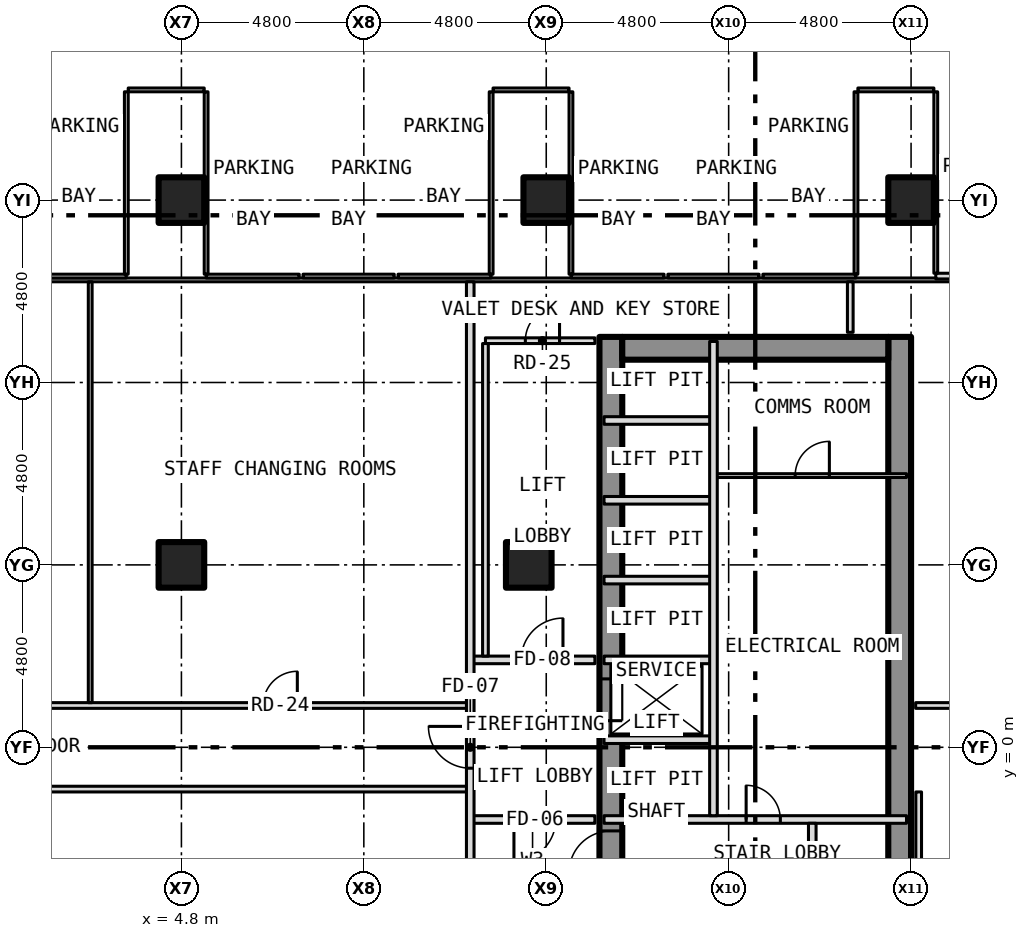
"""IFC4 building model, lengths in metres.
Left out: names, types, materials, properties, quantities, classifications, styles, units other than length and angle.
Written with IfcOpenShell. Run it as: python <this file> out.ifc"""

import sys

from ifc_helpers import new_model, si_unit, direction, frame, frame_2d, origin, origin_2d, place, context, subcontext, project, spatial, rectangle, hollow_rectangle, extrude, element, fill, save


model = new_model("IFC4")
c1 = context("Model", 3, precision=1e-05, world=origin(), true_north=direction((0.0, 1.0)))
c2 = subcontext(c1, "Body", "Model", "MODEL_VIEW")
j1 = project(units=[si_unit("LENGTHUNIT", "METRE"), si_unit("PLANEANGLEUNIT", "RADIAN")], contexts=[c1])
p1 = place(None, origin())
s1 = spatial("IfcSite", under=j1, at=p1, CompositionType="ELEMENT")
p2 = place(p1, origin())
s2 = spatial("IfcBuilding", under=s1, at=p2, CompositionType="ELEMENT")
p3 = place(p2, frame((0.0, 0.0, -5.0)))
s3 = spatial("IfcBuildingStorey", under=s2, at=p3, CompositionType="ELEMENT", Elevation=-5.0)
for number, where, z_axis, x_axis in (
    (1, (4.8, 4.8, -0.3), (0.0, 0.0, 1.0), (1.0, 0.0, 0.0)),
    (2, (4.8, 14.4, -0.3), (0.0, 0.0, 1.0), (1.0, 0.0, 0.0)),
    (3, (13.94, 4.8, -0.3), (0.0, 0.0, 1.0), (1.0, 0.0, 0.0)),
    (4, (14.4, 14.4, -0.3), (0.0, 0.0, 1.0), (1.0, 0.0, 0.0)),
    (5, (24.0, 14.4, -0.3), (0.0, 0.0, 1.0), (1.0, 0.0, 0.0)),
):
    element("IfcColumn", number, at=place(p3, frame(where, z_axis=z_axis, x_axis=x_axis)), inside=s3, PredefinedType="COLUMN", context=c2, shape_type="SweptSolid", body=[
        extrude(hollow_rectangle(XDim=1.2, YDim=1.2, WallThickness=0.07, at=origin_2d()), origin(), (0.0, 0.0, 1.0), 5.0),
    ])
p4 = place(p3, frame((16.1, -10.8, 0.0), z_axis=(0.0, 0.0, 1.0), x_axis=(0.0, 1.0, 0.0)))
e6 = element("IfcWall", 6, at=p4, inside=s3, PredefinedType="SHEAR", context=c2, shape_type="SweptSolid", body=[
    extrude(rectangle(XDim=21.6, YDim=0.6, at=frame_2d((10.8, 0.0))), origin(), (0.0, 0.0, 1.0), 4.7),
])
p5 = place(p4, frame((11.5, 0.0, 0.0)))
e7 = element("IfcOpeningElement", 7, at=p5, cuts=e6, PredefinedType="OPENING", context=c2, shape_type="SweptSolid", body=[
    extrude(rectangle(XDim=1.1, YDim=2.1, at=frame_2d((0.55, 1.05))), frame((0.0, 0.312, 0.0), z_axis=(0.0, -1.0, 0.0), x_axis=(1.0, 0.0, 0.0)), (0.0, 0.0, 1.0), 0.624),
])
p6 = place(p4, frame((5.642, 0.0, 0.0)))
e8 = element("IfcOpeningElement", 8, at=p6, cuts=e6, PredefinedType="OPENING", context=c2, shape_type="SweptSolid", body=[
    extrude(rectangle(XDim=1.1, YDim=2.1, at=frame_2d((0.55, 1.05))), frame((0.0, 0.312, 0.0), z_axis=(0.0, -1.0, 0.0), x_axis=(1.0, 0.0, 0.0)), (0.0, 0.0, 1.0), 0.624),
])
p7 = place(p4, frame((7.5, 0.0, 0.0)))
e9 = element("IfcOpeningElement", 9, at=p7, cuts=e6, PredefinedType="OPENING", context=c2, shape_type="SweptSolid", body=[
    extrude(rectangle(XDim=1.1, YDim=2.1, at=frame_2d((0.55, 1.05))), frame((0.0, 0.312, 0.0), z_axis=(0.0, -1.0, 0.0), x_axis=(1.0, 0.0, 0.0)), (0.0, 0.0, 1.0), 0.624),
])
p8 = place(p3, frame((23.7, -10.8, 0.0), z_axis=(0.0, 0.0, 1.0), x_axis=(0.0, 1.0, 0.0)))
e10 = element("IfcWall", 10, at=p8, inside=s3, PredefinedType="SHEAR", context=c2, shape_type="SweptSolid", body=[
    extrude(rectangle(XDim=21.6, YDim=0.6, at=frame_2d((10.8, 0.0))), origin(), (0.0, 0.0, 1.0), 4.7),
])
p9 = place(p3, frame((16.4, 10.5, 0.0), z_axis=(0.0, 0.0, 1.0), x_axis=(1.0, 0.0, 0.0)))
e11 = element("IfcWall", 11, at=p9, inside=s3, PredefinedType="SHEAR", context=c2, shape_type="SweptSolid", body=[
    extrude(rectangle(XDim=7.0, YDim=0.6, at=frame_2d((3.5, 0.0))), origin(), (0.0, 0.0, 1.0), 4.7),
])
p10 = place(p3, frame((12.4, -1.9, 0.0), z_axis=(0.0, 0.0, 1.0), x_axis=(1.0, 0.0, 0.0)))
e12 = element("IfcWall", 12, at=p10, inside=s3, PredefinedType="PARTITIONING", context=c2, shape_type="SweptSolid", body=[
    extrude(rectangle(XDim=3.28, YDim=0.2, at=frame_2d((1.64, 0.0))), origin(), (0.0, 0.0, 1.0), 4.7),
])
p11 = place(p10, frame((1.15, 0.0, 0.0)))
e13 = element("IfcOpeningElement", 13, at=p11, cuts=e12, PredefinedType="OPENING", context=c2, shape_type="SweptSolid", body=[
    extrude(rectangle(XDim=1.1, YDim=2.1, at=frame_2d((0.55, 1.05))), frame((0.0, 0.112, 0.0), z_axis=(0.0, -1.0, 0.0), x_axis=(1.0, 0.0, 0.0)), (0.0, 0.0, 1.0), 0.224),
])
p12 = place(p3, frame((15.92, -1.9, 0.0), z_axis=(0.0, 0.0, 1.0), x_axis=(1.0, 0.0, 0.0)))
e14 = element("IfcWall", 14, at=p12, inside=s3, PredefinedType="PARTITIONING", context=c2, shape_type="SweptSolid", body=[
    extrude(rectangle(XDim=7.96, YDim=0.2, at=frame_2d((3.98, 0.0))), origin(), (0.0, 0.0, 1.0), 4.7),
])
p13 = place(p12, frame((3.74, 0.0, 0.0)))
e15 = element("IfcOpeningElement", 15, at=p13, cuts=e14, PredefinedType="OPENING", context=c2, shape_type="SweptSolid", body=[
    extrude(rectangle(XDim=0.9, YDim=2.1, at=frame_2d((0.45, 1.05))), frame((0.0, 0.112, 0.0), z_axis=(0.0, -1.0, 0.0), x_axis=(1.0, 0.0, 0.0)), (0.0, 0.0, 1.0), 0.224),
])
p14 = place(p3, frame((-12.4, -1.1, 0.0), z_axis=(0.0, 0.0, 1.0), x_axis=(1.0, 0.0, 0.0)))
e16 = element("IfcWall", 16, at=p14, inside=s3, PredefinedType="PARTITIONING", context=c2, shape_type="SweptSolid", body=[
    extrude(rectangle(XDim=24.8, YDim=0.15, at=frame_2d((12.4, 0.0))), origin(), (0.0, 0.0, 1.0), 4.7),
])
p15 = place(p3, frame((15.92, 0.2, 0.0), z_axis=(0.0, 0.0, 1.0), x_axis=(1.0, 0.0, 0.0)))
e17 = element("IfcWall", 17, at=p15, inside=s3, PredefinedType="PARTITIONING", context=c2, shape_type="SweptSolid", body=[
    extrude(rectangle(XDim=2.88, YDim=0.2, at=frame_2d((1.44, 0.0))), origin(), (0.0, 0.0, 1.0), 4.7),
])
p16 = place(p3, frame((-12.4, 1.1, 0.0), z_axis=(0.0, 0.0, 1.0), x_axis=(1.0, 0.0, 0.0)))
e18 = element("IfcWall", 18, at=p16, inside=s3, PredefinedType="PARTITIONING", context=c2, shape_type="SweptSolid", body=[
    extrude(rectangle(XDim=24.8, YDim=0.15, at=frame_2d((12.4, 0.0))), origin(), (0.0, 0.0, 1.0), 4.7),
])
p17 = place(p16, frame((9.35, 0.0, 0.0)))
e19 = element("IfcOpeningElement", 19, at=p17, cuts=e18, PredefinedType="OPENING", context=c2, shape_type="SweptSolid", body=[
    extrude(rectangle(XDim=0.9, YDim=2.1, at=frame_2d((0.45, 1.05))), frame((0.0, 0.087, 0.0), z_axis=(0.0, -1.0, 0.0), x_axis=(1.0, 0.0, 0.0)), (0.0, 0.0, 1.0), 0.174),
])
p18 = place(p16, frame((19.35, 0.0, 0.0)))
e20 = element("IfcOpeningElement", 20, at=p18, cuts=e18, PredefinedType="OPENING", context=c2, shape_type="SweptSolid", body=[
    extrude(rectangle(XDim=0.9, YDim=2.1, at=frame_2d((0.45, 1.05))), frame((0.0, 0.087, 0.0), z_axis=(0.0, -1.0, 0.0), x_axis=(1.0, 0.0, 0.0)), (0.0, 0.0, 1.0), 0.174),
])
p19 = place(p3, frame((24.12, 1.1, 0.0), z_axis=(0.0, 0.0, 1.0), x_axis=(1.0, 0.0, 0.0)))
e21 = element("IfcWall", 21, at=p19, inside=s3, PredefinedType="PARTITIONING", context=c2, shape_type="SweptSolid", body=[
    extrude(rectangle(XDim=8.23, YDim=0.15, at=frame_2d((4.115, 0.0))), origin(), (0.0, 0.0, 1.0), 4.7),
])
p20 = place(p19, frame((3.63, 0.0, 0.0)))
e22 = element("IfcOpeningElement", 22, at=p20, cuts=e21, PredefinedType="OPENING", context=c2, shape_type="SweptSolid", body=[
    extrude(rectangle(XDim=0.9, YDim=2.1, at=frame_2d((0.45, 1.05))), frame((0.0, 0.087, 0.0), z_axis=(0.0, -1.0, 0.0), x_axis=(1.0, 0.0, 0.0)), (0.0, 0.0, 1.0), 0.174),
])
p21 = place(p3, frame((12.4, 2.3, 0.0), z_axis=(0.0, 0.0, 1.0), x_axis=(1.0, 0.0, 0.0)))
e23 = element("IfcWall", 23, at=p21, inside=s3, PredefinedType="PARTITIONING", context=c2, shape_type="SweptSolid", body=[
    extrude(rectangle(XDim=3.28, YDim=0.2, at=frame_2d((1.64, 0.0))), origin(), (0.0, 0.0, 1.0), 4.7),
])
p22 = place(p21, frame((1.34, 0.0, 0.0)))
e24 = element("IfcOpeningElement", 24, at=p22, cuts=e23, PredefinedType="OPENING", context=c2, shape_type="SweptSolid", body=[
    extrude(rectangle(XDim=1.1, YDim=2.1, at=frame_2d((0.55, 1.05))), frame((0.0, 0.112, 0.0), z_axis=(0.0, -1.0, 0.0), x_axis=(1.0, 0.0, 0.0)), (0.0, 0.0, 1.0), 0.224),
])
for number, where, z_axis, x_axis in (
    (25, (15.92, 2.3, 0.0), (0.0, 0.0, 1.0), (1.0, 0.0, 0.0)),
    (26, (15.92, 4.4, 0.0), (0.0, 0.0, 1.0), (1.0, 0.0, 0.0)),
    (27, (15.92, 6.5, 0.0), (0.0, 0.0, 1.0), (1.0, 0.0, 0.0)),
):
    element("IfcWall", number, at=place(p3, frame(where, z_axis=z_axis, x_axis=x_axis)), inside=s3, PredefinedType="PARTITIONING", context=c2, shape_type="SweptSolid", body=[
        extrude(rectangle(XDim=2.88, YDim=0.2, at=frame_2d((1.44, 0.0))), origin(), (0.0, 0.0, 1.0), 4.7),
    ])
p23 = place(p3, frame((18.8, 7.15, 0.0), z_axis=(0.0, 0.0, 1.0), x_axis=(1.0, 0.0, 0.0)))
e28 = element("IfcWall", 28, at=p23, inside=s3, PredefinedType="PARTITIONING", context=c2, shape_type="SweptSolid", body=[
    extrude(rectangle(XDim=5.08, YDim=0.1, at=frame_2d((2.54, 0.0))), origin(), (0.0, 0.0, 1.0), 4.7),
])
p24 = place(p23, frame((2.15, 0.0, 0.0)))
e29 = element("IfcOpeningElement", 29, at=p24, cuts=e28, PredefinedType="OPENING", context=c2, shape_type="SweptSolid", body=[
    extrude(rectangle(XDim=0.9, YDim=2.1, at=frame_2d((0.45, 1.05))), frame((0.0, 0.062, 0.0), z_axis=(0.0, -1.0, 0.0), x_axis=(1.0, 0.0, 0.0)), (0.0, 0.0, 1.0), 0.124),
])
p25 = place(p3, frame((15.92, 8.6, 0.0), z_axis=(0.0, 0.0, 1.0), x_axis=(1.0, 0.0, 0.0)))
e30 = element("IfcWall", 30, at=p25, inside=s3, PredefinedType="PARTITIONING", context=c2, shape_type="SweptSolid", body=[
    extrude(rectangle(XDim=2.88, YDim=0.2, at=frame_2d((1.44, 0.0))), origin(), (0.0, 0.0, 1.0), 4.7),
])
p26 = place(p3, frame((12.8, 10.7, 0.0), z_axis=(0.0, 0.0, 1.0), x_axis=(1.0, 0.0, 0.0)))
e31 = element("IfcWall", 31, at=p26, inside=s3, PredefinedType="PARTITIONING", context=c2, shape_type="SweptSolid", body=[
    extrude(rectangle(XDim=2.88, YDim=0.15, at=frame_2d((1.44, 0.0))), origin(), (0.0, 0.0, 1.0), 4.7),
])
p27 = place(p26, frame((1.05, 0.0, 0.0)))
e32 = element("IfcOpeningElement", 32, at=p27, cuts=e31, PredefinedType="OPENING", context=c2, shape_type="SweptSolid", body=[
    extrude(rectangle(XDim=0.9, YDim=2.1, at=frame_2d((0.45, 1.05))), frame((0.0, 0.087, 0.0), z_axis=(0.0, -1.0, 0.0), x_axis=(1.0, 0.0, 0.0)), (0.0, 0.0, 1.0), 0.174),
])
p28 = place(p3, frame((-37.6, 12.3, 0.0), z_axis=(0.0, 0.0, 1.0), x_axis=(1.0, 0.0, 0.0)))
e33 = element("IfcWall", 33, at=p28, inside=s3, PredefinedType="PARTITIONING", context=c2, shape_type="SweptSolid", body=[
    extrude(rectangle(XDim=70.0, YDim=0.1, at=frame_2d((35.0, 0.0))), origin(), (0.0, 0.0, 1.0), 4.7),
])
p29 = place(p3, frame((0.9, 12.4, 0.0), z_axis=(0.0, 0.0, 1.0), x_axis=(1.0, 0.0, 0.0)))
e34 = element("IfcWall", 34, at=p29, inside=s3, PredefinedType="PARTITIONING", context=c2, shape_type="SweptSolid", body=[
    extrude(rectangle(XDim=2.45, YDim=0.1, at=frame_2d((1.225, 0.0))), origin(), (0.0, 0.0, 1.0), 4.7),
])
p30 = place(p3, frame((5.45, 12.4, 0.0), z_axis=(0.0, 0.0, 1.0), x_axis=(1.0, 0.0, 0.0)))
e35 = element("IfcWall", 35, at=p30, inside=s3, PredefinedType="PARTITIONING", context=c2, shape_type="SweptSolid", body=[
    extrude(rectangle(XDim=2.45, YDim=0.1, at=frame_2d((1.225, 0.0))), origin(), (0.0, 0.0, 1.0), 4.7),
])
p31 = place(p3, frame((8.0, 12.4, 0.0), z_axis=(0.0, 0.0, 1.0), x_axis=(1.0, 0.0, 0.0)))
e36 = element("IfcWall", 36, at=p31, inside=s3, PredefinedType="PARTITIONING", context=c2, shape_type="SweptSolid", body=[
    extrude(rectangle(XDim=2.4, YDim=0.1, at=frame_2d((1.2, 0.0))), origin(), (0.0, 0.0, 1.0), 4.7),
])
for number, where, z_axis, x_axis in (
    (37, (10.5, 12.4, 0.0), (0.0, 0.0, 1.0), (1.0, 0.0, 0.0)),
    (38, (15.05, 12.4, 0.0), (0.0, 0.0, 1.0), (1.0, 0.0, 0.0)),
):
    element("IfcWall", number, at=place(p3, frame(where, z_axis=z_axis, x_axis=x_axis)), inside=s3, PredefinedType="PARTITIONING", context=c2, shape_type="SweptSolid", body=[
        extrude(rectangle(XDim=2.45, YDim=0.1, at=frame_2d((1.225, 0.0))), origin(), (0.0, 0.0, 1.0), 4.7),
    ])
p32 = place(p3, frame((17.6, 12.4, 0.0), z_axis=(0.0, 0.0, 1.0), x_axis=(1.0, 0.0, 0.0)))
e39 = element("IfcWall", 39, at=p32, inside=s3, PredefinedType="PARTITIONING", context=c2, shape_type="SweptSolid", body=[
    extrude(rectangle(XDim=2.4, YDim=0.1, at=frame_2d((1.2, 0.0))), origin(), (0.0, 0.0, 1.0), 4.7),
])
p33 = place(p3, frame((20.1, 12.4, 0.0), z_axis=(0.0, 0.0, 1.0), x_axis=(1.0, 0.0, 0.0)))
e40 = element("IfcWall", 40, at=p33, inside=s3, PredefinedType="PARTITIONING", context=c2, shape_type="SweptSolid", body=[
    extrude(rectangle(XDim=2.45, YDim=0.1, at=frame_2d((1.225, 0.0))), origin(), (0.0, 0.0, 1.0), 4.7),
])
p34 = place(p3, frame((24.65, 12.4, 0.0), z_axis=(0.0, 0.0, 1.0), x_axis=(1.0, 0.0, 0.0)))
e41 = element("IfcWall", 41, at=p34, inside=s3, PredefinedType="PARTITIONING", context=c2, shape_type="SweptSolid", body=[
    extrude(rectangle(XDim=2.45, YDim=0.15, at=frame_2d((1.225, 0.0))), origin(), (0.0, 0.0, 1.0), 4.7),
])
for number, where, z_axis, x_axis in (
    (42, (3.4, 17.3, 0.0), (0.0, 0.0, 1.0), (1.0, 0.0, 0.0)),
    (43, (13.0, 17.3, 0.0), (0.0, 0.0, 1.0), (1.0, 0.0, 0.0)),
    (44, (22.6, 17.3, 0.0), (0.0, 0.0, 1.0), (1.0, 0.0, 0.0)),
):
    element("IfcWall", number, at=place(p3, frame(where, z_axis=z_axis, x_axis=x_axis)), inside=s3, PredefinedType="PARTITIONING", context=c2, shape_type="SweptSolid", body=[
        extrude(rectangle(XDim=2.0, YDim=0.1, at=frame_2d((1.0, 0.0))), origin(), (0.0, 0.0, 1.0), 4.7),
    ])
p35 = place(p3, frame((2.4, 1.175, 0.0), z_axis=(0.0, 0.0, 1.0), x_axis=(0.0, 1.0, 0.0)))
e45 = element("IfcWall", 45, at=p35, inside=s3, PredefinedType="PARTITIONING", context=c2, shape_type="SweptSolid", body=[
    extrude(rectangle(XDim=11.075, YDim=0.1, at=frame_2d((5.538, 0.0))), origin(), (0.0, 0.0, 1.0), 4.7),
])
for number, where, z_axis, x_axis in (
    (46, (3.35, 12.45, 0.0), (0.0, 0.0, 1.0), (0.0, 1.0, 0.0)),
    (47, (5.45, 12.45, 0.0), (0.0, 0.0, 1.0), (0.0, 1.0, 0.0)),
):
    element("IfcWall", number, at=place(p3, frame(where, z_axis=z_axis, x_axis=x_axis)), inside=s3, PredefinedType="PARTITIONING", context=c2, shape_type="SweptSolid", body=[
        extrude(rectangle(XDim=4.8, YDim=0.1, at=frame_2d((2.4, 0.0))), origin(), (0.0, 0.0, 1.0), 4.7),
    ])
p36 = place(p3, frame((12.4, -10.725, 0.0), z_axis=(0.0, 0.0, 1.0), x_axis=(0.0, 1.0, 0.0)))
e48 = element("IfcWall", 48, at=p36, inside=s3, PredefinedType="PARTITIONING", context=c2, shape_type="SweptSolid", body=[
    extrude(rectangle(XDim=22.975, YDim=0.2, at=frame_2d((11.488, 0.0))), origin(), (0.0, 0.0, 1.0), 4.7),
])
p37 = place(p36, frame((10.175, 0.0, 0.0)))
e49 = element("IfcOpeningElement", 49, at=p37, cuts=e48, PredefinedType="OPENING", context=c2, shape_type="SweptSolid", body=[
    extrude(rectangle(XDim=1.1, YDim=2.1, at=frame_2d((0.55, 1.05))), frame((0.0, 0.112, 0.0), z_axis=(0.0, -1.0, 0.0), x_axis=(1.0, 0.0, 0.0)), (0.0, 0.0, 1.0), 0.224),
])
p38 = place(p3, frame((12.8, 2.4, 0.0), z_axis=(0.0, 0.0, 1.0), x_axis=(0.0, 1.0, 0.0)))
e50 = element("IfcWall", 50, at=p38, inside=s3, PredefinedType="PARTITIONING", context=c2, shape_type="SweptSolid", body=[
    extrude(rectangle(XDim=8.225, YDim=0.15, at=frame_2d((4.113, 0.0))), origin(), (0.0, 0.0, 1.0), 4.7),
])
for number, where, z_axis, x_axis in (
    (51, (12.95, 12.45, 0.0), (0.0, 0.0, 1.0), (0.0, 1.0, 0.0)),
    (52, (15.05, 12.45, 0.0), (0.0, 0.0, 1.0), (0.0, 1.0, 0.0)),
):
    element("IfcWall", number, at=place(p3, frame(where, z_axis=z_axis, x_axis=x_axis)), inside=s3, PredefinedType="PARTITIONING", context=c2, shape_type="SweptSolid", body=[
        extrude(rectangle(XDim=4.8, YDim=0.1, at=frame_2d((2.4, 0.0))), origin(), (0.0, 0.0, 1.0), 4.7),
    ])
p39 = place(p3, frame((18.8, -1.8, 0.0), z_axis=(0.0, 0.0, 1.0), x_axis=(0.0, 1.0, 0.0)))
e53 = element("IfcWall", 53, at=p39, inside=s3, PredefinedType="PARTITIONING", context=c2, shape_type="SweptSolid", body=[
    extrude(rectangle(XDim=12.48, YDim=0.2, at=frame_2d((6.24, 0.0))), origin(), (0.0, 0.0, 1.0), 4.7),
])
p40 = place(p3, frame((21.4, -10.68, 0.0), z_axis=(0.0, 0.0, 1.0), x_axis=(0.0, 1.0, 0.0)))
e54 = element("IfcWall", 54, at=p40, inside=s3, PredefinedType="PARTITIONING", context=c2, shape_type="SweptSolid", body=[
    extrude(rectangle(XDim=8.68, YDim=0.2, at=frame_2d((4.34, 0.0))), origin(), (0.0, 0.0, 1.0), 4.7),
])
p41 = place(p40, frame((1.21, 0.0, 0.0)))
e55 = element("IfcOpeningElement", 55, at=p41, cuts=e54, PredefinedType="OPENING", context=c2, shape_type="SweptSolid", body=[
    extrude(rectangle(XDim=0.9, YDim=2.1, at=frame_2d((0.45, 1.05))), frame((0.0, 0.112, 0.0), z_axis=(0.0, -1.0, 0.0), x_axis=(1.0, 0.0, 0.0)), (0.0, 0.0, 1.0), 0.224),
])
p42 = place(p40, frame((5.66, 0.0, 0.0)))
e56 = element("IfcOpeningElement", 56, at=p42, cuts=e54, PredefinedType="OPENING", context=c2, shape_type="SweptSolid", body=[
    extrude(rectangle(XDim=0.9, YDim=2.1, at=frame_2d((0.45, 1.05))), frame((0.0, 0.112, 0.0), z_axis=(0.0, -1.0, 0.0), x_axis=(1.0, 0.0, 0.0)), (0.0, 0.0, 1.0), 0.224),
])
p43 = place(p3, frame((22.4, 10.92, 0.0), z_axis=(0.0, 0.0, 1.0), x_axis=(0.0, 1.0, 0.0)))
e57 = element("IfcWall", 57, at=p43, inside=s3, PredefinedType="PARTITIONING", context=c2, shape_type="SweptSolid", body=[
    extrude(rectangle(XDim=1.33, YDim=0.15, at=frame_2d((0.665, 0.0))), origin(), (0.0, 0.0, 1.0), 4.7),
])
p44 = place(p3, frame((22.55, 12.45, 0.0), z_axis=(0.0, 0.0, 1.0), x_axis=(0.0, 1.0, 0.0)))
e58 = element("IfcWall", 58, at=p44, inside=s3, PredefinedType="PARTITIONING", context=c2, shape_type="SweptSolid", body=[
    extrude(rectangle(XDim=4.8, YDim=0.1, at=frame_2d((2.4, 0.0))), origin(), (0.0, 0.0, 1.0), 4.7),
])
p45 = place(p3, frame((24.2, -10.725, 0.0), z_axis=(0.0, 0.0, 1.0), x_axis=(0.0, 1.0, 0.0)))
e59 = element("IfcWall", 59, at=p45, inside=s3, PredefinedType="PARTITIONING", context=c2, shape_type="SweptSolid", body=[
    extrude(rectangle(XDim=9.55, YDim=0.15, at=frame_2d((4.775, 0.0))), origin(), (0.0, 0.0, 1.0), 4.7),
])
p46 = place(p3, frame((24.65, 12.475, 0.0), z_axis=(0.0, 0.0, 1.0), x_axis=(0.0, 1.0, 0.0)))
e60 = element("IfcWall", 60, at=p46, inside=s3, PredefinedType="PARTITIONING", context=c2, shape_type="SweptSolid", body=[
    extrude(rectangle(XDim=4.775, YDim=0.1, at=frame_2d((2.387, 0.0))), origin(), (0.0, 0.0, 1.0), 4.7),
])
p47 = place(p5, origin())
e61 = element("IfcDoor", 61, at=p47, inside=s3, OperationType="SLIDING_TO_LEFT", PredefinedType="DOOR", context=c2, shape_type="SweptSolid", body=[
    extrude(rectangle(XDim=1.1, YDim=2.1, at=frame_2d((0.55, 1.05))), frame((0.0, 0.025, 0.0), z_axis=(0.0, -1.0, 0.0), x_axis=(1.0, 0.0, 0.0)), (0.0, 0.0, 1.0), 0.05),
])
fill(e7, e61)
p48 = place(p7, origin())
e62 = element("IfcDoor", 62, at=p48, inside=s3, OperationType="SINGLE_SWING_LEFT", PredefinedType="DOOR", context=c2, shape_type="SweptSolid", body=[
    extrude(rectangle(XDim=1.1, YDim=2.1, at=frame_2d((0.55, 1.05))), frame((0.0, 0.025, 0.0), z_axis=(0.0, -1.0, 0.0), x_axis=(1.0, 0.0, 0.0)), (0.0, 0.0, 1.0), 0.05),
])
fill(e9, e62)
p49 = place(p13, origin())
e63 = element("IfcDoor", 63, at=p49, inside=s3, OperationType="SINGLE_SWING_LEFT", PredefinedType="DOOR", context=c2, shape_type="SweptSolid", body=[
    extrude(rectangle(XDim=0.9, YDim=2.1, at=frame_2d((0.45, 1.05))), frame((0.0, 0.025, 0.0), z_axis=(0.0, -1.0, 0.0), x_axis=(1.0, 0.0, 0.0)), (0.0, 0.0, 1.0), 0.05),
])
fill(e15, e63)
p50 = place(p24, origin())
e64 = element("IfcDoor", 64, at=p50, inside=s3, OperationType="SINGLE_SWING_RIGHT", PredefinedType="DOOR", context=c2, shape_type="SweptSolid", body=[
    extrude(rectangle(XDim=0.9, YDim=2.1, at=frame_2d((0.45, 1.05))), frame((0.0, 0.025, 0.0), z_axis=(0.0, -1.0, 0.0), x_axis=(1.0, 0.0, 0.0)), (0.0, 0.0, 1.0), 0.05),
])
fill(e29, e64)
p51 = place(p11, origin())
e65 = element("IfcDoor", 65, at=p51, inside=s3, OperationType="SINGLE_SWING_LEFT", PredefinedType="DOOR", context=c2, shape_type="SweptSolid", body=[
    extrude(rectangle(XDim=1.1, YDim=2.1, at=frame_2d((0.55, 1.05))), frame((0.0, 0.025, 0.0), z_axis=(0.0, -1.0, 0.0), x_axis=(1.0, 0.0, 0.0)), (0.0, 0.0, 1.0), 0.05),
])
fill(e13, e65)
p52 = place(p37, origin())
e66 = element("IfcDoor", 66, at=p52, inside=s3, OperationType="SINGLE_SWING_RIGHT", PredefinedType="DOOR", context=c2, shape_type="SweptSolid", body=[
    extrude(rectangle(XDim=1.1, YDim=2.1, at=frame_2d((0.55, 1.05))), frame((0.0, 0.025, 0.0), z_axis=(0.0, -1.0, 0.0), x_axis=(1.0, 0.0, 0.0)), (0.0, 0.0, 1.0), 0.05),
])
fill(e49, e66)
p53 = place(p22, origin())
e67 = element("IfcDoor", 67, at=p53, inside=s3, OperationType="SINGLE_SWING_RIGHT", PredefinedType="DOOR", context=c2, shape_type="SweptSolid", body=[
    extrude(rectangle(XDim=1.1, YDim=2.1, at=frame_2d((0.55, 1.05))), frame((0.0, 0.025, 0.0), z_axis=(0.0, -1.0, 0.0), x_axis=(1.0, 0.0, 0.0)), (0.0, 0.0, 1.0), 0.05),
])
fill(e24, e67)
p54 = place(p18, origin())
e68 = element("IfcDoor", 68, at=p54, inside=s3, OperationType="SINGLE_SWING_RIGHT", PredefinedType="DOOR", context=c2, shape_type="SweptSolid", body=[
    extrude(rectangle(XDim=0.9, YDim=2.1, at=frame_2d((0.45, 1.05))), frame((0.0, 0.025, 0.0), z_axis=(0.0, -1.0, 0.0), x_axis=(1.0, 0.0, 0.0)), (0.0, 0.0, 1.0), 0.05),
])
fill(e20, e68)
p55 = place(p27, origin())
e69 = element("IfcDoor", 69, at=p55, inside=s3, OperationType="SINGLE_SWING_RIGHT", PredefinedType="DOOR", context=c2, shape_type="SweptSolid", body=[
    extrude(rectangle(XDim=0.9, YDim=2.1, at=frame_2d((0.45, 1.05))), frame((0.0, 0.025, 0.0), z_axis=(0.0, -1.0, 0.0), x_axis=(1.0, 0.0, 0.0)), (0.0, 0.0, 1.0), 0.05),
])
fill(e32, e69)
save(model, sys.argv[1])
